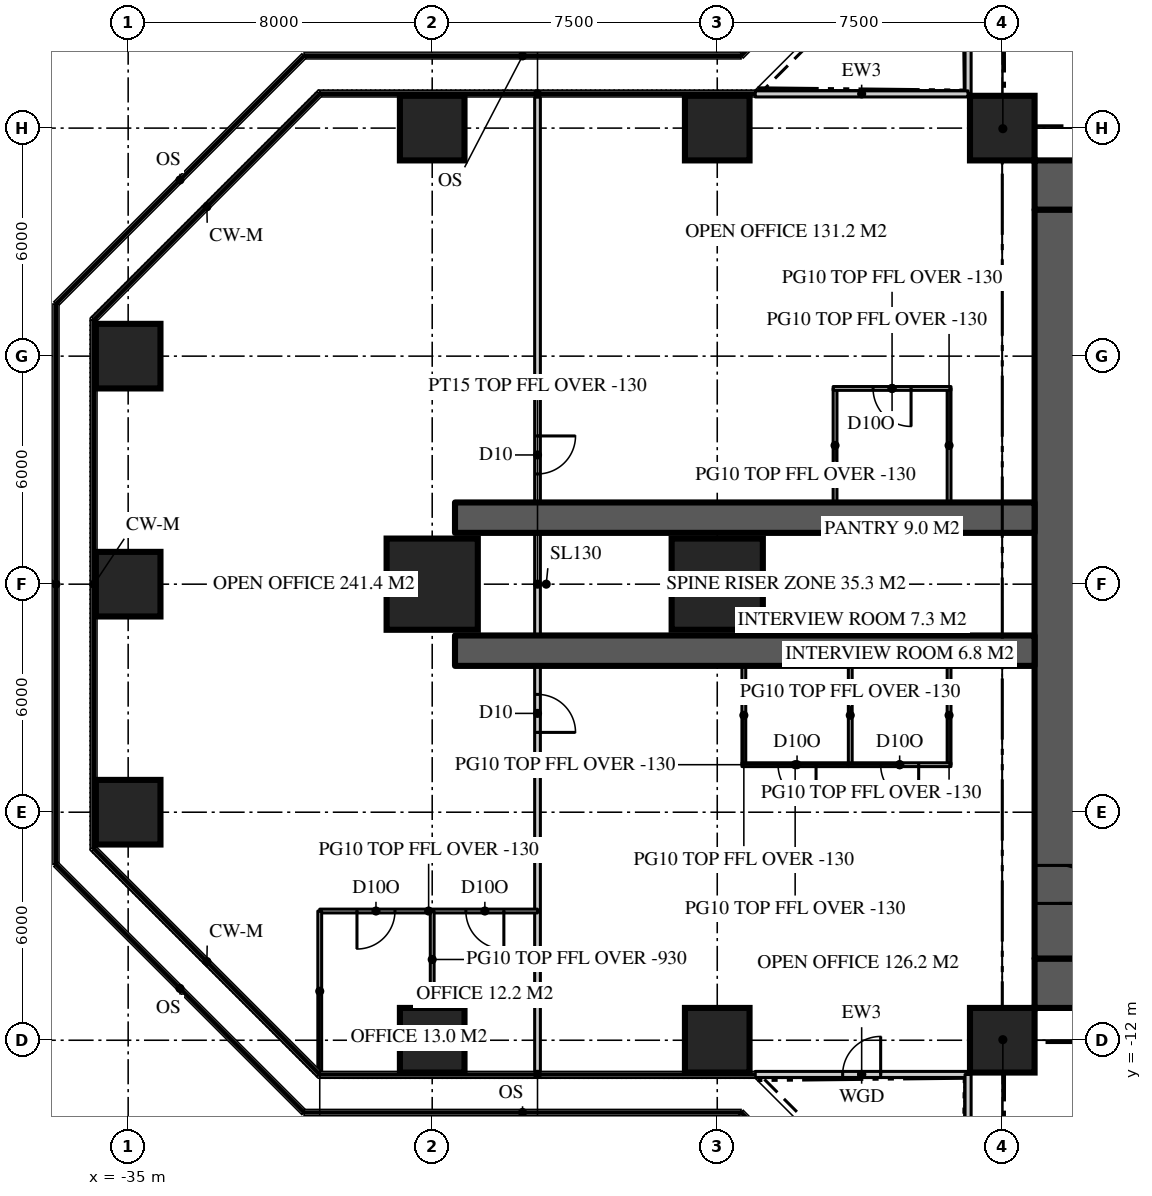
"""IFC4 building model, lengths in metres.
Left out: names, types, materials, properties, quantities, classifications, styles, units other than length and angle.
Written with IfcOpenShell. Run it as: python <this file> out.ifc"""

import sys

from ifc_helpers import new_model, si_unit, direction, frame, frame_2d, origin, origin_2d, place, context, subcontext, project, spatial, rectangle, extrude, element, fill, save


model = new_model("IFC4")
c1 = context("Model", 3, precision=1e-05, world=origin(), true_north=direction((0.0, 1.0)))
c2 = subcontext(c1, "Body", "Model", "MODEL_VIEW")
j1 = project(units=[si_unit("LENGTHUNIT", "METRE"), si_unit("PLANEANGLEUNIT", "RADIAN")], contexts=[c1])
p1 = place(None, origin())
s1 = spatial("IfcSite", under=j1, at=p1, CompositionType="ELEMENT")
p2 = place(p1, origin())
s2 = spatial("IfcBuilding", under=s1, at=p2, CompositionType="ELEMENT")
p3 = place(p2, frame((0.0, 0.0, 143.7)))
s3 = spatial("IfcBuildingStorey", under=s2, at=p3, CompositionType="ELEMENT", Elevation=143.7)
p4 = place(p3, frame((-11.15, 10.5, 0.0), z_axis=(0.0, 0.0, 1.0), x_axis=(1.0, 0.0, 0.0)))
e1 = element("IfcWall", 1, at=p4, inside=s3, PredefinedType="SHEAR", context=c2, shape_type="SweptSolid", body=[
    extrude(rectangle(XDim=22.3, YDim=1.3, at=frame_2d((11.15, 0.0))), origin(), (0.0, 0.0, 1.0), 3.9),
])
p5 = place(p4, frame((4.25, 0.0, 0.0)))
e2 = element("IfcOpeningElement", 2, at=p5, cuts=e1, PredefinedType="OPENING", context=c2, shape_type="SweptSolid", body=[
    extrude(rectangle(XDim=1.8, YDim=2.2, at=frame_2d((0.9, 1.1))), frame((0.0, 0.66, 0.0), z_axis=(0.0, -1.0, 0.0), x_axis=(1.0, 0.0, 0.0)), (0.0, 0.0, 1.0), 1.32),
])
p6 = place(p4, frame((16.25, 0.0, 0.0)))
e3 = element("IfcOpeningElement", 3, at=p6, cuts=e1, PredefinedType="OPENING", context=c2, shape_type="SweptSolid", body=[
    extrude(rectangle(XDim=1.8, YDim=2.2, at=frame_2d((0.9, 1.1))), frame((0.0, 0.66, 0.0), z_axis=(0.0, -1.0, 0.0), x_axis=(1.0, 0.0, 0.0)), (0.0, 0.0, 1.0), 1.32),
])
p7 = place(p3, frame((11.15, -10.5, 0.0), z_axis=(0.0, 0.0, 1.0), x_axis=(-1.0, 0.0, 0.0)))
e4 = element("IfcWall", 4, at=p7, inside=s3, PredefinedType="SHEAR", context=c2, shape_type="SweptSolid", body=[
    extrude(rectangle(XDim=22.3, YDim=1.3, at=frame_2d((11.15, 0.0))), origin(), (0.0, 0.0, 1.0), 3.9),
])
p8 = place(p7, frame((16.25, 0.0, 0.0)))
e5 = element("IfcOpeningElement", 5, at=p8, cuts=e4, PredefinedType="OPENING", context=c2, shape_type="SweptSolid", body=[
    extrude(rectangle(XDim=1.8, YDim=2.2, at=frame_2d((0.9, 1.1))), frame((0.0, 0.66, 0.0), z_axis=(0.0, -1.0, 0.0), x_axis=(1.0, 0.0, 0.0)), (0.0, 0.0, 1.0), 1.32),
])
p9 = place(p7, frame((4.25, 0.0, 0.0)))
e6 = element("IfcOpeningElement", 6, at=p9, cuts=e4, PredefinedType="OPENING", context=c2, shape_type="SweptSolid", body=[
    extrude(rectangle(XDim=1.8, YDim=2.2, at=frame_2d((0.9, 1.1))), frame((0.0, 0.66, 0.0), z_axis=(0.0, -1.0, 0.0), x_axis=(1.0, 0.0, 0.0)), (0.0, 0.0, 1.0), 1.32),
])
p10 = place(p3, frame((-10.5, 9.85, 0.0), z_axis=(0.0, 0.0, 1.0), x_axis=(0.0, -1.0, 0.0)))
e7 = element("IfcWall", 7, at=p10, inside=s3, PredefinedType="SHEAR", context=c2, shape_type="SweptSolid", body=[
    extrude(rectangle(XDim=19.7, YDim=1.3, at=frame_2d((9.85, 0.0))), origin(), (0.0, 0.0, 1.0), 3.9),
])
p11 = place(p10, frame((17.25, 0.0, 0.0)))
e8 = element("IfcOpeningElement", 8, at=p11, cuts=e7, PredefinedType="OPENING", context=c2, shape_type="SweptSolid", body=[
    extrude(rectangle(XDim=1.0, YDim=2.2, at=frame_2d((0.5, 1.1))), frame((0.0, 0.66, 0.0), z_axis=(0.0, -1.0, 0.0), x_axis=(1.0, 0.0, 0.0)), (0.0, 0.0, 1.0), 1.32),
])
for number, where, z_axis, x_axis in (
    (9, (-11.15, 1.75, 0.0), (0.0, 0.0, 1.0), (-1.0, 0.0, 0.0)),
    (10, (-11.15, -1.75, 0.0), (0.0, 0.0, 1.0), (-1.0, 0.0, 0.0)),
):
    element("IfcWall", number, at=place(p3, frame(where, z_axis=z_axis, x_axis=x_axis)), inside=s3, PredefinedType="SHEAR", context=c2, shape_type="SweptSolid", body=[
        extrude(rectangle(XDim=15.25, YDim=0.8, at=frame_2d((7.625, 0.0))), origin(), (0.0, 0.0, 1.0), 3.9),
    ])
for number, where, z_axis, x_axis in (
    (11, (-27.0, -12.0, 0.0), (0.0, 0.0, 1.0), (1.0, 0.0, 0.0)),
    (12, (-19.5, -12.0, 0.0), (0.0, 0.0, 1.0), (1.0, 0.0, 0.0)),
    (13, (-12.0, -12.0, 0.0), (0.0, 0.0, 1.0), (1.0, 0.0, 0.0)),
    (14, (-35.0, -6.0, 0.0), (0.0, 0.0, 1.0), (1.0, 0.0, 0.0)),
    (15, (-35.0, 0.0, 0.0), (0.0, 0.0, 1.0), (1.0, 0.0, 0.0)),
):
    element("IfcColumn", number, at=place(p3, frame(where, z_axis=z_axis, x_axis=x_axis)), inside=s3, PredefinedType="COLUMN", context=c2, shape_type="SweptSolid", body=[
        extrude(rectangle(XDim=1.7, YDim=1.7, at=origin_2d()), origin(), (0.0, 0.0, 1.0), 3.9),
    ])
for number, where, z_axis, x_axis in (
    (16, (-27.0, 0.0, 0.0), (0.0, 0.0, 1.0), (1.0, 0.0, 0.0)),
    (17, (-19.5, 0.0, 0.0), (0.0, 0.0, 1.0), (1.0, 0.0, 0.0)),
):
    element("IfcColumn", number, at=place(p3, frame(where, z_axis=z_axis, x_axis=x_axis)), inside=s3, PredefinedType="COLUMN", context=c2, shape_type="SweptSolid", body=[
        extrude(rectangle(XDim=2.4, YDim=2.4, at=origin_2d()), origin(), (0.0, 0.0, 1.0), 3.9),
    ])
for number, where, z_axis, x_axis in (
    (18, (-35.0, 6.0, 0.0), (0.0, 0.0, 1.0), (1.0, 0.0, 0.0)),
    (19, (-27.0, 12.0, 0.0), (0.0, 0.0, 1.0), (1.0, 0.0, 0.0)),
    (20, (-19.5, 12.0, 0.0), (0.0, 0.0, 1.0), (1.0, 0.0, 0.0)),
    (21, (-12.0, 12.0, 0.0), (0.0, 0.0, 1.0), (1.0, 0.0, 0.0)),
):
    element("IfcColumn", number, at=place(p3, frame(where, z_axis=z_axis, x_axis=x_axis)), inside=s3, PredefinedType="COLUMN", context=c2, shape_type="SweptSolid", body=[
        extrude(rectangle(XDim=1.7, YDim=1.7, at=origin_2d()), origin(), (0.0, 0.0, 1.0), 3.9),
    ])
p12 = place(p3, frame((-12.9, 18.5, 0.0), z_axis=(0.0, 0.0, 1.0), x_axis=(0.0, -1.0, 0.0)))
e22 = element("IfcWall", 22, at=p12, inside=s3, PredefinedType="SOLIDWALL", context=c2, shape_type="SweptSolid", body=[
    extrude(rectangle(XDim=5.6, YDim=0.16, at=frame_2d((2.8, 0.0))), origin(), (0.0, 0.0, 1.0), 3.77),
])
p13 = place(p12, frame((2.3, 0.0, 0.0)))
e23 = element("IfcOpeningElement", 23, at=p13, cuts=e22, PredefinedType="OPENING", context=c2, shape_type="SweptSolid", body=[
    extrude(rectangle(XDim=1.0, YDim=2.2, at=frame_2d((0.5, 1.1))), frame((0.0, 0.09, 0.0), z_axis=(0.0, -1.0, 0.0), x_axis=(1.0, 0.0, 0.0)), (0.0, 0.0, 1.0), 0.18),
])
p14 = place(p3, frame((-12.9, 12.9, 0.0), z_axis=(0.0, 0.0, 1.0), x_axis=(-1.0, 0.0, 0.0)))
e24 = element("IfcWall", 24, at=p14, inside=s3, PredefinedType="SOLIDWALL", context=c2, shape_type="SweptSolid", body=[
    extrude(rectangle(XDim=5.6, YDim=0.16, at=frame_2d((2.8, 0.0))), origin(), (0.0, 0.0, 1.0), 3.77),
])
p15 = place(p3, frame((-18.5, -12.9, 0.0), z_axis=(0.0, 0.0, 1.0), x_axis=(1.0, 0.0, 0.0)))
e25 = element("IfcWall", 25, at=p15, inside=s3, PredefinedType="SOLIDWALL", context=c2, shape_type="SweptSolid", body=[
    extrude(rectangle(XDim=5.6, YDim=0.16, at=frame_2d((2.8, 0.0))), origin(), (0.0, 0.0, 1.0), 3.77),
])
p16 = place(p15, frame((2.3, 0.0, 0.0)))
e26 = element("IfcOpeningElement", 26, at=p16, cuts=e25, PredefinedType="OPENING", context=c2, shape_type="SweptSolid", body=[
    extrude(rectangle(XDim=1.0, YDim=2.2, at=frame_2d((0.5, 1.1))), frame((0.0, 0.09, 0.0), z_axis=(0.0, -1.0, 0.0), x_axis=(1.0, 0.0, 0.0)), (0.0, 0.0, 1.0), 0.18),
])
p17 = place(p3, frame((-12.9, -12.9, 0.0), z_axis=(0.0, 0.0, 1.0), x_axis=(0.0, -1.0, 0.0)))
e27 = element("IfcWall", 27, at=p17, inside=s3, PredefinedType="SOLIDWALL", context=c2, shape_type="SweptSolid", body=[
    extrude(rectangle(XDim=5.6, YDim=0.16, at=frame_2d((2.8, 0.0))), origin(), (0.0, 0.0, 1.0), 3.77),
])
p18 = place(p3, frame((-24.229, 12.82, 0.0), z_axis=(0.0, 0.0, 1.0), x_axis=(0.0, -1.0, 0.0)))
e28 = element("IfcWall", 28, at=p18, inside=s3, PredefinedType="PARTITIONING", context=c2, shape_type="SweptSolid", body=[
    extrude(rectangle(XDim=25.64, YDim=0.15, at=frame_2d((12.82, 0.0))), origin(), (0.0, 0.0, 1.0), 3.77),
])
p19 = place(p18, frame((15.72, 0.0, 0.0)))
e29 = element("IfcOpeningElement", 29, at=p19, cuts=e28, PredefinedType="OPENING", context=c2, shape_type="SweptSolid", body=[
    extrude(rectangle(XDim=1.0, YDim=2.2, at=frame_2d((0.5, 1.1))), frame((0.0, 0.085, 0.0), z_axis=(0.0, -1.0, 0.0), x_axis=(1.0, 0.0, 0.0)), (0.0, 0.0, 1.0), 0.17),
])
p20 = place(p18, frame((8.92, 0.0, 0.0)))
e30 = element("IfcOpeningElement", 30, at=p20, cuts=e28, PredefinedType="OPENING", context=c2, shape_type="SweptSolid", body=[
    extrude(rectangle(XDim=1.0, YDim=2.2, at=frame_2d((0.5, 1.1))), frame((0.0, 0.085, 0.0), z_axis=(0.0, -1.0, 0.0), x_axis=(1.0, 0.0, 0.0)), (0.0, 0.0, 1.0), 0.17),
])
p21 = place(p3, frame((-24.229, -8.6, 0.0), z_axis=(0.0, 0.0, 1.0), x_axis=(-1.0, 0.0, 0.0)))
e31 = element("IfcWall", 31, at=p21, inside=s3, PredefinedType="PARTITIONING", context=c2, shape_type="SweptSolid", body=[
    extrude(rectangle(XDim=5.73, YDim=0.1, at=frame_2d((2.865, 0.0))), origin(), (0.0, 0.0, 1.0), 3.77),
])
p22 = place(p21, frame((0.885, 0.0, 0.0)))
e32 = element("IfcOpeningElement", 32, at=p22, cuts=e31, PredefinedType="OPENING", context=c2, shape_type="SweptSolid", body=[
    extrude(rectangle(XDim=1.0, YDim=2.2, at=frame_2d((0.5, 1.1))), frame((0.0, 0.06, 0.0), z_axis=(0.0, -1.0, 0.0), x_axis=(1.0, 0.0, 0.0)), (0.0, 0.0, 1.0), 0.12),
])
p23 = place(p21, frame((3.75, 0.0, 0.0)))
e33 = element("IfcOpeningElement", 33, at=p23, cuts=e31, PredefinedType="OPENING", context=c2, shape_type="SweptSolid", body=[
    extrude(rectangle(XDim=1.0, YDim=2.2, at=frame_2d((0.5, 1.1))), frame((0.0, 0.06, 0.0), z_axis=(0.0, -1.0, 0.0), x_axis=(1.0, 0.0, 0.0)), (0.0, 0.0, 1.0), 0.12),
])
p24 = place(p3, frame((-27.0, -8.6, 0.0), z_axis=(0.0, 0.0, 1.0), x_axis=(0.0, -1.0, 0.0)))
e34 = element("IfcWall", 34, at=p24, inside=s3, PredefinedType="PARTITIONING", context=c2, shape_type="SweptSolid", body=[
    extrude(rectangle(XDim=2.55, YDim=0.1, at=frame_2d((1.275, 0.0))), origin(), (0.0, 0.0, 1.0), 2.97),
])
p25 = place(p3, frame((-29.959, -8.6, 0.0), z_axis=(0.0, 0.0, 1.0), x_axis=(0.0, -1.0, 0.0)))
e35 = element("IfcWall", 35, at=p25, inside=s3, PredefinedType="PARTITIONING", context=c2, shape_type="SweptSolid", body=[
    extrude(rectangle(XDim=4.22, YDim=0.1, at=frame_2d((2.11, 0.0))), origin(), (0.0, 0.0, 1.0), 3.77),
])
for number, where, z_axis, x_axis in (
    (36, (-13.4, -2.15, 0.0), (0.0, 0.0, 1.0), (0.0, -1.0, 0.0)),
    (37, (-16.0, -2.15, 0.0), (0.0, 0.0, 1.0), (0.0, -1.0, 0.0)),
):
    element("IfcWall", number, at=place(p3, frame(where, z_axis=z_axis, x_axis=x_axis)), inside=s3, PredefinedType="PARTITIONING", context=c2, shape_type="SweptSolid", body=[
        extrude(rectangle(XDim=2.6, YDim=0.1, at=frame_2d((1.3, 0.0))), origin(), (0.0, 0.0, 1.0), 3.77),
    ])
p26 = place(p3, frame((-13.35, -4.75, 0.0), z_axis=(0.0, 0.0, 1.0), x_axis=(-1.0, 0.0, 0.0)))
e38 = element("IfcWall", 38, at=p26, inside=s3, PredefinedType="PARTITIONING", context=c2, shape_type="SweptSolid", body=[
    extrude(rectangle(XDim=2.7, YDim=0.1, at=frame_2d((1.35, 0.0))), origin(), (0.0, 0.0, 1.0), 3.77),
])
p27 = place(p26, frame((0.85, 0.0, 0.0)))
e39 = element("IfcOpeningElement", 39, at=p27, cuts=e38, PredefinedType="OPENING", context=c2, shape_type="SweptSolid", body=[
    extrude(rectangle(XDim=1.0, YDim=2.2, at=frame_2d((0.5, 1.1))), frame((0.0, 0.06, 0.0), z_axis=(0.0, -1.0, 0.0), x_axis=(1.0, 0.0, 0.0)), (0.0, 0.0, 1.0), 0.12),
])
p28 = place(p3, frame((-18.8, -2.15, 0.0), z_axis=(0.0, 0.0, 1.0), x_axis=(0.0, -1.0, 0.0)))
e40 = element("IfcWall", 40, at=p28, inside=s3, PredefinedType="PARTITIONING", context=c2, shape_type="SweptSolid", body=[
    extrude(rectangle(XDim=2.6, YDim=0.1, at=frame_2d((1.3, 0.0))), origin(), (0.0, 0.0, 1.0), 3.77),
])
p29 = place(p3, frame((-16.05, -4.75, 0.0), z_axis=(0.0, 0.0, 1.0), x_axis=(-1.0, 0.0, 0.0)))
e41 = element("IfcWall", 41, at=p29, inside=s3, PredefinedType="PARTITIONING", context=c2, shape_type="SweptSolid", body=[
    extrude(rectangle(XDim=2.8, YDim=0.1, at=frame_2d((1.4, 0.0))), origin(), (0.0, 0.0, 1.0), 3.77),
])
p30 = place(p29, frame((0.85, 0.0, 0.0)))
e42 = element("IfcOpeningElement", 42, at=p30, cuts=e41, PredefinedType="OPENING", context=c2, shape_type="SweptSolid", body=[
    extrude(rectangle(XDim=1.0, YDim=2.2, at=frame_2d((0.5, 1.1))), frame((0.0, 0.06, 0.0), z_axis=(0.0, -1.0, 0.0), x_axis=(1.0, 0.0, 0.0)), (0.0, 0.0, 1.0), 0.12),
])
for number, where, z_axis, x_axis in (
    (43, (-13.4, 2.15, 0.0), (0.0, 0.0, 1.0), (0.0, 1.0, 0.0)),
    (44, (-16.4, 2.15, 0.0), (0.0, 0.0, 1.0), (0.0, 1.0, 0.0)),
):
    element("IfcWall", number, at=place(p3, frame(where, z_axis=z_axis, x_axis=x_axis)), inside=s3, PredefinedType="PARTITIONING", context=c2, shape_type="SweptSolid", body=[
        extrude(rectangle(XDim=3.0, YDim=0.1, at=frame_2d((1.5, 0.0))), origin(), (0.0, 0.0, 1.0), 3.77),
    ])
p31 = place(p3, frame((-13.35, 5.15, 0.0), z_axis=(0.0, 0.0, 1.0), x_axis=(-1.0, 0.0, 0.0)))
e45 = element("IfcWall", 45, at=p31, inside=s3, PredefinedType="PARTITIONING", context=c2, shape_type="SweptSolid", body=[
    extrude(rectangle(XDim=3.1, YDim=0.1, at=frame_2d((1.55, 0.0))), origin(), (0.0, 0.0, 1.0), 3.77),
])
p32 = place(p31, frame((1.05, 0.0, 0.0)))
e46 = element("IfcOpeningElement", 46, at=p32, cuts=e45, PredefinedType="OPENING", context=c2, shape_type="SweptSolid", body=[
    extrude(rectangle(XDim=1.0, YDim=2.2, at=frame_2d((0.5, 1.1))), frame((0.0, 0.06, 0.0), z_axis=(0.0, -1.0, 0.0), x_axis=(1.0, 0.0, 0.0)), (0.0, 0.0, 1.0), 0.12),
])
for number, where, z_axis, x_axis in (
    (47, (-11.15, 11.15, 0.0), (0.0, 0.0, 1.0), (-0.707, 0.707, 0.0)),
    (48, (-11.15, -11.15, 0.0), (0.0, 0.0, 1.0), (-0.707, -0.707, 0.0)),
):
    element("IfcWall", number, at=place(p3, frame(where, z_axis=z_axis, x_axis=x_axis)), inside=s3, PredefinedType="PARTITIONING", context=c2, shape_type="SweptSolid", body=[
        extrude(rectangle(XDim=2.362, YDim=0.15, at=frame_2d((1.181, 0.0))), origin(), (0.0, 0.0, 1.0), 3.22),
    ])
p33 = place(p16, origin())
e49 = element("IfcDoor", 49, at=p33, inside=s3, OperationType="SINGLE_SWING_RIGHT", PredefinedType="DOOR", context=c2, shape_type="SweptSolid", body=[
    extrude(rectangle(XDim=1.0, YDim=2.2, at=frame_2d((0.5, 1.1))), frame((0.0, 0.025, 0.0), z_axis=(0.0, -1.0, 0.0), x_axis=(1.0, 0.0, 0.0)), (0.0, 0.0, 1.0), 0.05),
])
fill(e26, e49)
p34 = place(p11, origin())
e50 = element("IfcDoor", 50, at=p34, inside=s3, OperationType="SINGLE_SWING_RIGHT", PredefinedType="DOOR", context=c2, shape_type="SweptSolid", body=[
    extrude(rectangle(XDim=1.0, YDim=2.2, at=frame_2d((0.5, 1.1))), frame((0.0, 0.025, 0.0), z_axis=(0.0, -1.0, 0.0), x_axis=(1.0, 0.0, 0.0)), (0.0, 0.0, 1.0), 0.05),
])
fill(e8, e50)
p35 = place(p19, origin())
e51 = element("IfcDoor", 51, at=p35, inside=s3, OperationType="SINGLE_SWING_RIGHT", PredefinedType="DOOR", context=c2, shape_type="SweptSolid", body=[
    extrude(rectangle(XDim=1.0, YDim=2.2, at=frame_2d((0.5, 1.1))), frame((0.0, 0.025, 0.0), z_axis=(0.0, -1.0, 0.0), x_axis=(1.0, 0.0, 0.0)), (0.0, 0.0, 1.0), 0.05),
])
fill(e29, e51)
p36 = place(p20, origin())
e52 = element("IfcDoor", 52, at=p36, inside=s3, OperationType="SINGLE_SWING_LEFT", PredefinedType="DOOR", context=c2, shape_type="SweptSolid", body=[
    extrude(rectangle(XDim=1.0, YDim=2.2, at=frame_2d((0.5, 1.1))), frame((0.0, 0.025, 0.0), z_axis=(0.0, -1.0, 0.0), x_axis=(1.0, 0.0, 0.0)), (0.0, 0.0, 1.0), 0.05),
])
fill(e30, e52)
p37 = place(p22, origin())
e53 = element("IfcDoor", 53, at=p37, inside=s3, OperationType="SINGLE_SWING_LEFT", PredefinedType="DOOR", context=c2, shape_type="SweptSolid", body=[
    extrude(rectangle(XDim=1.0, YDim=2.2, at=frame_2d((0.5, 1.1))), frame((0.0, 0.025, 0.0), z_axis=(0.0, -1.0, 0.0), x_axis=(1.0, 0.0, 0.0)), (0.0, 0.0, 1.0), 0.05),
])
fill(e32, e53)
p38 = place(p23, origin())
e54 = element("IfcDoor", 54, at=p38, inside=s3, OperationType="SINGLE_SWING_RIGHT", PredefinedType="DOOR", context=c2, shape_type="SweptSolid", body=[
    extrude(rectangle(XDim=1.0, YDim=2.2, at=frame_2d((0.5, 1.1))), frame((0.0, 0.025, 0.0), z_axis=(0.0, -1.0, 0.0), x_axis=(1.0, 0.0, 0.0)), (0.0, 0.0, 1.0), 0.05),
])
fill(e33, e54)
p39 = place(p27, origin())
e55 = element("IfcDoor", 55, at=p39, inside=s3, OperationType="SINGLE_SWING_LEFT", PredefinedType="DOOR", context=c2, shape_type="SweptSolid", body=[
    extrude(rectangle(XDim=1.0, YDim=2.2, at=frame_2d((0.5, 1.1))), frame((0.0, 0.025, 0.0), z_axis=(0.0, -1.0, 0.0), x_axis=(1.0, 0.0, 0.0)), (0.0, 0.0, 1.0), 0.05),
])
fill(e39, e55)
p40 = place(p30, origin())
e56 = element("IfcDoor", 56, at=p40, inside=s3, OperationType="SINGLE_SWING_LEFT", PredefinedType="DOOR", context=c2, shape_type="SweptSolid", body=[
    extrude(rectangle(XDim=1.0, YDim=2.2, at=frame_2d((0.5, 1.1))), frame((0.0, 0.025, 0.0), z_axis=(0.0, -1.0, 0.0), x_axis=(1.0, 0.0, 0.0)), (0.0, 0.0, 1.0), 0.05),
])
fill(e42, e56)
p41 = place(p32, origin())
e57 = element("IfcDoor", 57, at=p41, inside=s3, OperationType="SINGLE_SWING_LEFT", PredefinedType="DOOR", context=c2, shape_type="SweptSolid", body=[
    extrude(rectangle(XDim=1.0, YDim=2.2, at=frame_2d((0.5, 1.1))), frame((0.0, 0.025, 0.0), z_axis=(0.0, -1.0, 0.0), x_axis=(1.0, 0.0, 0.0)), (0.0, 0.0, 1.0), 0.05),
])
fill(e46, e57)
save(model, sys.argv[1])
